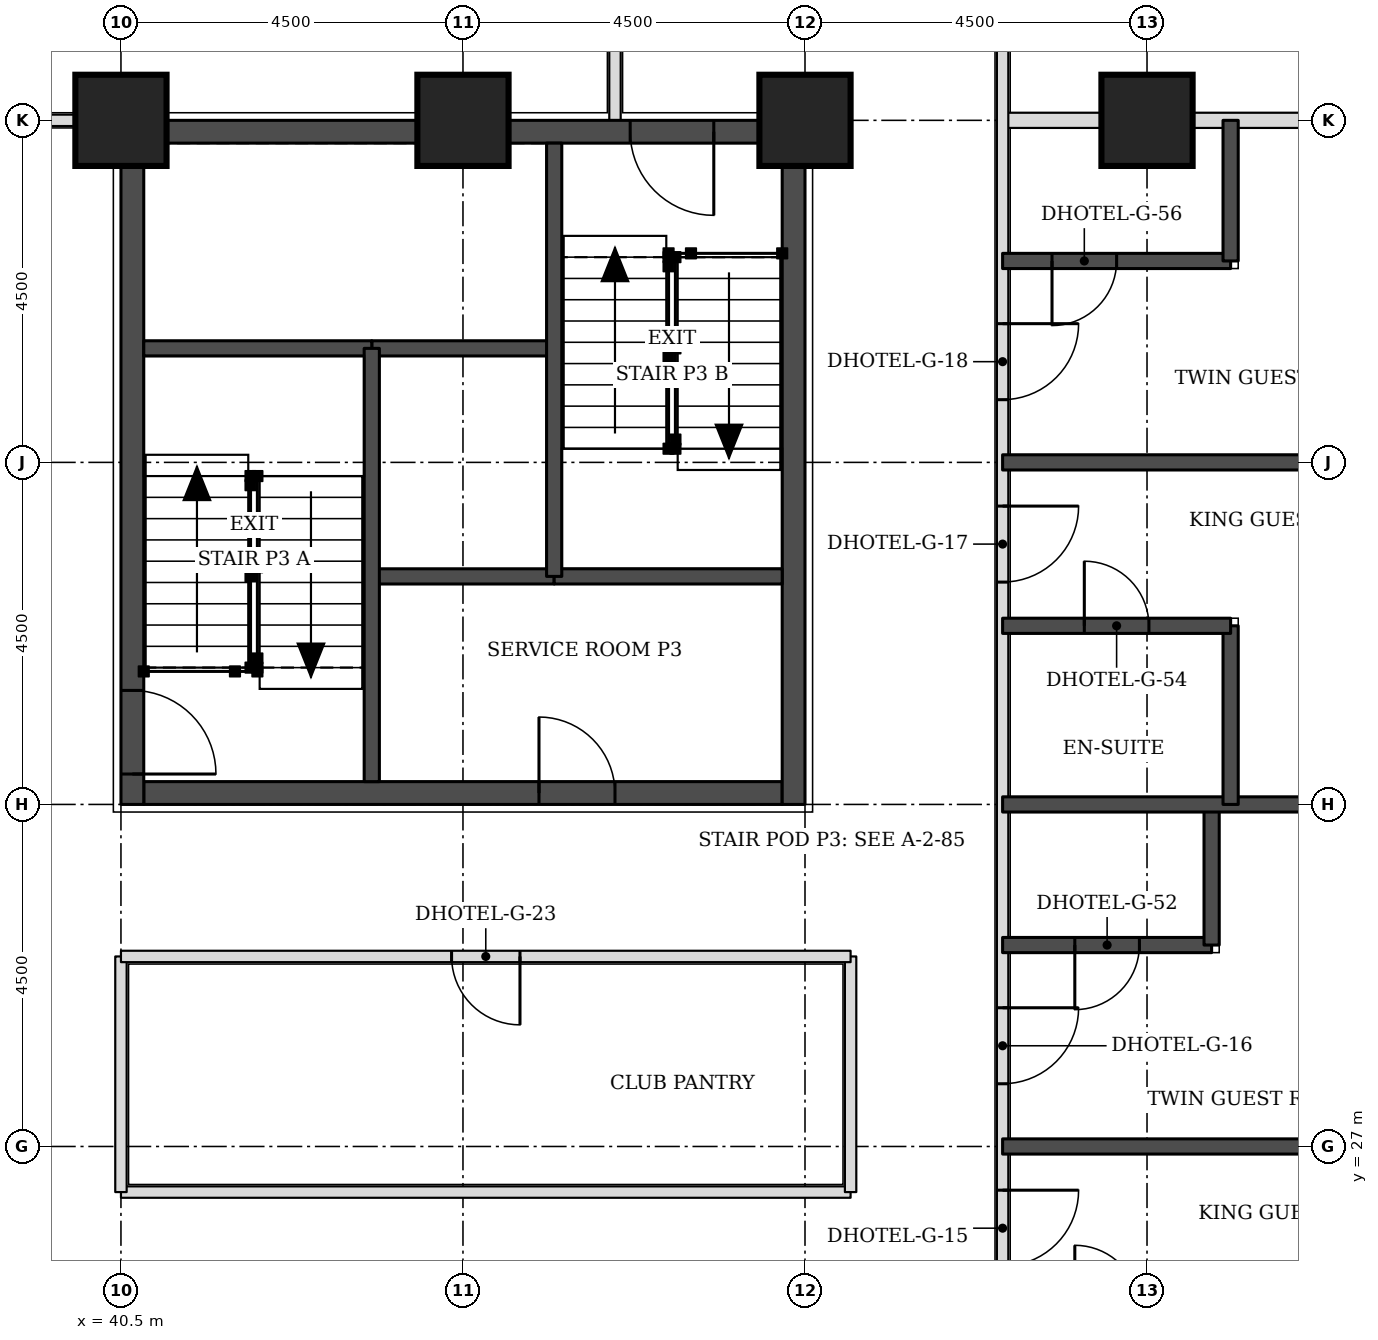
"""IFC4 building model, lengths in metres.
Left out: names, types, materials, properties, quantities, classifications, styles, units other than length and angle.
Written with IfcOpenShell. Run it as: python <this file> out.ifc"""

import sys

from ifc_helpers import new_model, si_unit, direction, frame, frame_2d, origin, origin_2d, place, context, subcontext, project, spatial, rectangle, extrude, element, fill, save


model = new_model("IFC4")
c1 = context("Model", 3, precision=1e-05, world=origin(), true_north=direction((0.0, 1.0)))
c2 = subcontext(c1, "Body", "Model", "MODEL_VIEW")
j1 = project(units=[si_unit("LENGTHUNIT", "METRE"), si_unit("PLANEANGLEUNIT", "RADIAN")], contexts=[c1])
p1 = place(None, origin())
s1 = spatial("IfcSite", under=j1, at=p1, CompositionType="ELEMENT")
p2 = place(p1, origin())
s2 = spatial("IfcBuilding", under=s1, at=p2, CompositionType="ELEMENT")
p3 = place(p2, frame((0.0, 0.0, 66.0)))
s3 = spatial("IfcBuildingStorey", under=s2, at=p3, CompositionType="ELEMENT", Elevation=66.0)
for number, where, z_axis, x_axis in (
    (1, (40.5, 40.5, 0.0), (0.0, 0.0, 1.0), (1.0, 0.0, 0.0)),
    (2, (45.0, 40.5, 0.0), (0.0, 0.0, 1.0), (1.0, 0.0, 0.0)),
    (3, (49.5, 40.5, 0.0), (0.0, 0.0, 1.0), (1.0, 0.0, 0.0)),
    (4, (54.0, 40.5, 0.0), (0.0, 0.0, 1.0), (1.0, 0.0, 0.0)),
):
    element("IfcColumn", number, at=place(p3, frame(where, z_axis=z_axis, x_axis=x_axis)), inside=s3, PredefinedType="COLUMN", context=c2, shape_type="SweptSolid", body=[
        extrude(rectangle(XDim=1.2, YDim=1.2, at=origin_2d()), origin(), (0.0, 0.0, 1.0), 3.3),
    ])
p4 = place(p3, frame((40.8, 31.65, 0.0), z_axis=(0.0, 0.0, 1.0), x_axis=(1.0, 0.0, 0.0)))
e5 = element("IfcWall", 5, at=p4, inside=s3, PredefinedType="SHEAR", context=c2, shape_type="SweptSolid", body=[
    extrude(rectangle(XDim=8.4, YDim=0.3, at=frame_2d((4.2, 0.0))), origin(), (0.0, 0.0, 1.0), 3.3),
])
p5 = place(p4, frame((5.2, 0.0, 0.0)))
e6 = element("IfcOpeningElement", 6, at=p5, cuts=e5, PredefinedType="OPENING", context=c2, shape_type="SweptSolid", body=[
    extrude(rectangle(XDim=1.0, YDim=2.1, at=frame_2d((0.5, 1.05))), frame((0.0, 0.16, 0.0), z_axis=(0.0, -1.0, 0.0), x_axis=(1.0, 0.0, 0.0)), (0.0, 0.0, 1.0), 0.32),
])
p6 = place(p3, frame((40.8, 40.35, 0.0), z_axis=(0.0, 0.0, 1.0), x_axis=(1.0, 0.0, 0.0)))
e7 = element("IfcWall", 7, at=p6, inside=s3, PredefinedType="SHEAR", context=c2, shape_type="SweptSolid", body=[
    extrude(rectangle(XDim=8.4, YDim=0.3, at=frame_2d((4.2, 0.0))), origin(), (0.0, 0.0, 1.0), 3.3),
])
p7 = place(p6, frame((6.4, 0.0, 0.0)))
e8 = element("IfcOpeningElement", 8, at=p7, cuts=e7, PredefinedType="OPENING", context=c2, shape_type="SweptSolid", body=[
    extrude(rectangle(XDim=1.1, YDim=2.1, at=frame_2d((0.55, 1.05))), frame((0.0, 0.16, 0.0), z_axis=(0.0, -1.0, 0.0), x_axis=(1.0, 0.0, 0.0)), (0.0, 0.0, 1.0), 0.32),
])
p8 = place(p3, frame((40.65, 31.5, 0.0), z_axis=(0.0, 0.0, 1.0), x_axis=(0.0, 1.0, 0.0)))
e9 = element("IfcWall", 9, at=p8, inside=s3, PredefinedType="SHEAR", context=c2, shape_type="SweptSolid", body=[
    extrude(rectangle(XDim=9.0, YDim=0.3, at=frame_2d((4.5, 0.0))), origin(), (0.0, 0.0, 1.0), 3.3),
])
p9 = place(p8, frame((0.4, 0.0, 0.0)))
e10 = element("IfcOpeningElement", 10, at=p9, cuts=e9, PredefinedType="OPENING", context=c2, shape_type="SweptSolid", body=[
    extrude(rectangle(XDim=1.1, YDim=2.1, at=frame_2d((0.55, 1.05))), frame((0.0, 0.16, 0.0), z_axis=(0.0, -1.0, 0.0), x_axis=(1.0, 0.0, 0.0)), (0.0, 0.0, 1.0), 0.32),
])
p10 = place(p3, frame((49.35, 31.5, 0.0), z_axis=(0.0, 0.0, 1.0), x_axis=(0.0, 1.0, 0.0)))
e11 = element("IfcWall", 11, at=p10, inside=s3, PredefinedType="SHEAR", context=c2, shape_type="SweptSolid", body=[
    extrude(rectangle(XDim=9.0, YDim=0.3, at=frame_2d((4.5, 0.0))), origin(), (0.0, 0.0, 1.0), 3.3),
])
p11 = place(p3, frame((52.1, 40.5, 0.0), z_axis=(0.0, 0.0, 1.0), x_axis=(1.0, 0.0, 0.0)))
e12 = element("IfcWall", 12, at=p11, inside=s3, PredefinedType="PARTITIONING", context=c2, shape_type="SweptSolid", body=[
    extrude(rectangle(XDim=5.8, YDim=0.2, at=frame_2d((2.9, 0.0))), origin(), (0.0, 0.0, 1.0), 2.33),
])
p12 = place(p3, frame((52.1, 24.4, 0.0), z_axis=(0.0, 0.0, 1.0), x_axis=(0.0, 1.0, 0.0)))
e13 = element("IfcWall", 13, at=p12, inside=s3, PredefinedType="PARTITIONING", context=c2, shape_type="SweptSolid", body=[
    extrude(rectangle(XDim=23.1, YDim=0.15, at=frame_2d((11.55, 0.0))), origin(), (0.0, 0.0, 1.0), 3.08),
])
p13 = place(p12, frame((1.025, 0.0, 0.0)))
e14 = element("IfcOpeningElement", 14, at=p13, cuts=e13, PredefinedType="OPENING", context=c2, shape_type="SweptSolid", body=[
    extrude(rectangle(XDim=1.0, YDim=2.1, at=frame_2d((0.5, 1.05))), frame((0.0, 0.085, 0.0), z_axis=(0.0, -1.0, 0.0), x_axis=(1.0, 0.0, 0.0)), (0.0, 0.0, 1.0), 0.17),
])
p14 = place(p12, frame((3.425, 0.0, 0.0)))
e15 = element("IfcOpeningElement", 15, at=p14, cuts=e13, PredefinedType="OPENING", context=c2, shape_type="SweptSolid", body=[
    extrude(rectangle(XDim=1.0, YDim=2.1, at=frame_2d((0.5, 1.05))), frame((0.0, 0.085, 0.0), z_axis=(0.0, -1.0, 0.0), x_axis=(1.0, 0.0, 0.0)), (0.0, 0.0, 1.0), 0.17),
])
p15 = place(p12, frame((10.025, 0.0, 0.0)))
e16 = element("IfcOpeningElement", 16, at=p15, cuts=e13, PredefinedType="OPENING", context=c2, shape_type="SweptSolid", body=[
    extrude(rectangle(XDim=1.0, YDim=2.1, at=frame_2d((0.5, 1.05))), frame((0.0, 0.085, 0.0), z_axis=(0.0, -1.0, 0.0), x_axis=(1.0, 0.0, 0.0)), (0.0, 0.0, 1.0), 0.17),
])
p16 = place(p12, frame((12.425, 0.0, 0.0)))
e17 = element("IfcOpeningElement", 17, at=p16, cuts=e13, PredefinedType="OPENING", context=c2, shape_type="SweptSolid", body=[
    extrude(rectangle(XDim=1.0, YDim=2.1, at=frame_2d((0.5, 1.05))), frame((0.0, 0.085, 0.0), z_axis=(0.0, -1.0, 0.0), x_axis=(1.0, 0.0, 0.0)), (0.0, 0.0, 1.0), 0.17),
])
p17 = place(p12, frame((19.15, 0.0, 0.0)))
e18 = element("IfcOpeningElement", 18, at=p17, cuts=e13, PredefinedType="OPENING", context=c2, shape_type="SweptSolid", body=[
    extrude(rectangle(XDim=0.9, YDim=2.1, at=frame_2d((0.45, 1.05))), frame((0.0, 0.085, 0.0), z_axis=(0.0, -1.0, 0.0), x_axis=(1.0, 0.0, 0.0)), (0.0, 0.0, 1.0), 0.17),
])
p18 = place(p3, frame((40.5, 26.4, 0.0), z_axis=(0.0, 0.0, 1.0), x_axis=(1.0, 0.0, 0.0)))
e19 = element("IfcWall", 19, at=p18, inside=s3, PredefinedType="PARTITIONING", context=c2, shape_type="SweptSolid", body=[
    extrude(rectangle(XDim=9.6, YDim=0.15, at=frame_2d((4.8, 0.0))), origin(), (0.0, 0.0, 1.0), 3.08),
])
for number, where, z_axis, x_axis in (
    (20, (40.5, 26.4, 0.0), (0.0, 0.0, 1.0), (0.0, 1.0, 0.0)),
    (21, (50.1, 26.4, 0.0), (0.0, 0.0, 1.0), (0.0, 1.0, 0.0)),
):
    element("IfcWall", number, at=place(p3, frame(where, z_axis=z_axis, x_axis=x_axis)), inside=s3, PredefinedType="PARTITIONING", context=c2, shape_type="SweptSolid", body=[
        extrude(rectangle(XDim=3.1, YDim=0.15, at=frame_2d((1.55, 0.0))), origin(), (0.0, 0.0, 1.0), 3.08),
    ])
p19 = place(p3, frame((40.5, 29.5, 0.0), z_axis=(0.0, 0.0, 1.0), x_axis=(1.0, 0.0, 0.0)))
e22 = element("IfcWall", 22, at=p19, inside=s3, PredefinedType="PARTITIONING", context=c2, shape_type="SweptSolid", body=[
    extrude(rectangle(XDim=9.6, YDim=0.15, at=frame_2d((4.8, 0.0))), origin(), (0.0, 0.0, 1.0), 3.08),
])
p20 = place(p19, frame((4.35, 0.0, 0.0)))
e23 = element("IfcOpeningElement", 23, at=p20, cuts=e22, PredefinedType="OPENING", context=c2, shape_type="SweptSolid", body=[
    extrude(rectangle(XDim=0.9, YDim=2.1, at=frame_2d((0.45, 1.05))), frame((0.0, 0.085, 0.0), z_axis=(0.0, -1.0, 0.0), x_axis=(1.0, 0.0, 0.0)), (0.0, 0.0, 1.0), 0.17),
])
p21 = place(p3, frame((38.5, 40.5, 0.0), z_axis=(0.0, 0.0, 1.0), x_axis=(1.0, 0.0, 0.0)))
e24 = element("IfcWall", 24, at=p21, inside=s3, PredefinedType="PARTITIONING", context=c2, shape_type="SweptSolid", body=[
    extrude(rectangle(XDim=1.95, YDim=0.15, at=frame_2d((0.975, 0.0))), origin(), (0.0, 0.0, 1.0), 2.33),
])
p22 = place(p3, frame((47.0, 40.5, 0.0), z_axis=(0.0, 0.0, 1.0), x_axis=(0.0, 1.0, 0.0)))
e25 = element("IfcWall", 25, at=p22, inside=s3, PredefinedType="PARTITIONING", context=c2, shape_type="SweptSolid", body=[
    extrude(rectangle(XDim=7.0, YDim=0.15, at=frame_2d((3.5, 0.0))), origin(), (0.0, 0.0, 1.0), 3.08),
])
p23 = place(p22, frame((3.05, 0.0, 0.0)))
e26 = element("IfcOpeningElement", 26, at=p23, cuts=e25, PredefinedType="OPENING", context=c2, shape_type="SweptSolid", body=[
    extrude(rectangle(XDim=0.9, YDim=2.1, at=frame_2d((0.45, 1.05))), frame((0.0, 0.085, 0.0), z_axis=(0.0, -1.0, 0.0), x_axis=(1.0, 0.0, 0.0)), (0.0, 0.0, 1.0), 0.17),
])
p24 = place(p3, frame((52.1, 27.0, 0.0), z_axis=(0.0, 0.0, 1.0), x_axis=(1.0, 0.0, 0.0)))
e27 = element("IfcWall", 27, at=p24, inside=s3, PredefinedType="SOLIDWALL", context=c2, shape_type="SweptSolid", body=[
    extrude(rectangle(XDim=5.8, YDim=0.2, at=frame_2d((2.9, 0.0))), origin(), (0.0, 0.0, 1.0), 3.08),
])
p25 = place(p3, frame((52.1, 29.65, 0.0), z_axis=(0.0, 0.0, 1.0), x_axis=(1.0, 0.0, 0.0)))
e28 = element("IfcWall", 28, at=p25, inside=s3, PredefinedType="SOLIDWALL", context=c2, shape_type="SweptSolid", body=[
    extrude(rectangle(XDim=2.75, YDim=0.2, at=frame_2d((1.375, 0.0))), origin(), (0.0, 0.0, 1.0), 3.08),
])
p26 = place(p25, frame((0.95, 0.0, 0.0)))
e29 = element("IfcOpeningElement", 29, at=p26, cuts=e28, PredefinedType="OPENING", context=c2, shape_type="SweptSolid", body=[
    extrude(rectangle(XDim=0.85, YDim=2.1, at=frame_2d((0.425, 1.05))), frame((0.0, 0.11, 0.0), z_axis=(0.0, -1.0, 0.0), x_axis=(1.0, 0.0, 0.0)), (0.0, 0.0, 1.0), 0.22),
])
p27 = place(p3, frame((54.85, 29.65, 0.0), z_axis=(0.0, 0.0, 1.0), x_axis=(0.0, 1.0, 0.0)))
e30 = element("IfcWall", 30, at=p27, inside=s3, PredefinedType="SOLIDWALL", context=c2, shape_type="SweptSolid", body=[
    extrude(rectangle(XDim=1.85, YDim=0.2, at=frame_2d((0.925, 0.0))), origin(), (0.0, 0.0, 1.0), 3.08),
])
p28 = place(p3, frame((52.1, 31.5, 0.0), z_axis=(0.0, 0.0, 1.0), x_axis=(1.0, 0.0, 0.0)))
e31 = element("IfcWall", 31, at=p28, inside=s3, PredefinedType="SOLIDWALL", context=c2, shape_type="SweptSolid", body=[
    extrude(rectangle(XDim=5.8, YDim=0.2, at=frame_2d((2.9, 0.0))), origin(), (0.0, 0.0, 1.0), 3.08),
])
p29 = place(p3, frame((55.1, 31.5, 0.0), z_axis=(0.0, 0.0, 1.0), x_axis=(0.0, 1.0, 0.0)))
e32 = element("IfcWall", 32, at=p29, inside=s3, PredefinedType="SOLIDWALL", context=c2, shape_type="SweptSolid", body=[
    extrude(rectangle(XDim=2.35, YDim=0.2, at=frame_2d((1.175, 0.0))), origin(), (0.0, 0.0, 1.0), 3.08),
])
p30 = place(p3, frame((52.1, 33.85, 0.0), z_axis=(0.0, 0.0, 1.0), x_axis=(1.0, 0.0, 0.0)))
e33 = element("IfcWall", 33, at=p30, inside=s3, PredefinedType="SOLIDWALL", context=c2, shape_type="SweptSolid", body=[
    extrude(rectangle(XDim=3.0, YDim=0.2, at=frame_2d((1.5, 0.0))), origin(), (0.0, 0.0, 1.0), 3.08),
])
p31 = place(p30, frame((1.075, 0.0, 0.0)))
e34 = element("IfcOpeningElement", 34, at=p31, cuts=e33, PredefinedType="OPENING", context=c2, shape_type="SweptSolid", body=[
    extrude(rectangle(XDim=0.85, YDim=2.1, at=frame_2d((0.425, 1.05))), frame((0.0, 0.11, 0.0), z_axis=(0.0, -1.0, 0.0), x_axis=(1.0, 0.0, 0.0)), (0.0, 0.0, 1.0), 0.22),
])
p32 = place(p3, frame((52.1, 36.0, 0.0), z_axis=(0.0, 0.0, 1.0), x_axis=(1.0, 0.0, 0.0)))
e35 = element("IfcWall", 35, at=p32, inside=s3, PredefinedType="SOLIDWALL", context=c2, shape_type="SweptSolid", body=[
    extrude(rectangle(XDim=5.8, YDim=0.2, at=frame_2d((2.9, 0.0))), origin(), (0.0, 0.0, 1.0), 3.08),
])
p33 = place(p3, frame((52.1, 38.65, 0.0), z_axis=(0.0, 0.0, 1.0), x_axis=(1.0, 0.0, 0.0)))
e36 = element("IfcWall", 36, at=p33, inside=s3, PredefinedType="SOLIDWALL", context=c2, shape_type="SweptSolid", body=[
    extrude(rectangle(XDim=3.0, YDim=0.2, at=frame_2d((1.5, 0.0))), origin(), (0.0, 0.0, 1.0), 3.08),
])
p34 = place(p33, frame((0.65, 0.0, 0.0)))
e37 = element("IfcOpeningElement", 37, at=p34, cuts=e36, PredefinedType="OPENING", context=c2, shape_type="SweptSolid", body=[
    extrude(rectangle(XDim=0.85, YDim=2.1, at=frame_2d((0.425, 1.05))), frame((0.0, 0.11, 0.0), z_axis=(0.0, -1.0, 0.0), x_axis=(1.0, 0.0, 0.0)), (0.0, 0.0, 1.0), 0.22),
])
p35 = place(p3, frame((55.1, 38.65, 0.0), z_axis=(0.0, 0.0, 1.0), x_axis=(0.0, 1.0, 0.0)))
e38 = element("IfcWall", 38, at=p35, inside=s3, PredefinedType="SOLIDWALL", context=c2, shape_type="SweptSolid", body=[
    extrude(rectangle(XDim=1.85, YDim=0.2, at=frame_2d((0.925, 0.0))), origin(), (0.0, 0.0, 1.0), 3.08),
])
p36 = place(p3, frame((43.8, 34.5, 0.0), z_axis=(0.0, 0.0, 1.0), x_axis=(1.0, 0.0, 0.0)))
e39 = element("IfcWall", 39, at=p36, inside=s3, PredefinedType="SOLIDWALL", context=c2, shape_type="SweptSolid", body=[
    extrude(rectangle(XDim=2.4, YDim=0.2, at=frame_2d((1.2, 0.0))), origin(), (0.0, 0.0, 1.0), 3.08),
])
p37 = place(p3, frame((46.2, 34.5, 0.0), z_axis=(0.0, 0.0, 1.0), x_axis=(1.0, 0.0, 0.0)))
e40 = element("IfcWall", 40, at=p37, inside=s3, PredefinedType="SOLIDWALL", context=c2, shape_type="SweptSolid", body=[
    extrude(rectangle(XDim=3.0, YDim=0.2, at=frame_2d((1.5, 0.0))), origin(), (0.0, 0.0, 1.0), 3.08),
])
p38 = place(p3, frame((43.8, 37.5, 0.0), z_axis=(0.0, 0.0, 1.0), x_axis=(1.0, 0.0, 0.0)))
e41 = element("IfcWall", 41, at=p38, inside=s3, PredefinedType="SOLIDWALL", context=c2, shape_type="SweptSolid", body=[
    extrude(rectangle(XDim=2.4, YDim=0.2, at=frame_2d((1.2, 0.0))), origin(), (0.0, 0.0, 1.0), 3.3),
])
p39 = place(p3, frame((40.8, 37.5, 0.0), z_axis=(0.0, 0.0, 1.0), x_axis=(1.0, 0.0, 0.0)))
e42 = element("IfcWall", 42, at=p39, inside=s3, PredefinedType="SOLIDWALL", context=c2, shape_type="SweptSolid", body=[
    extrude(rectangle(XDim=3.0, YDim=0.2, at=frame_2d((1.5, 0.0))), origin(), (0.0, 0.0, 1.0), 3.08),
])
for number, where, z_axis, x_axis in (
    (43, (43.8, 31.8, 0.0), (0.0, 0.0, 1.0), (0.0, 1.0, 0.0)),
    (44, (46.2, 34.5, 0.0), (0.0, 0.0, 1.0), (0.0, 1.0, 0.0)),
):
    element("IfcWall", number, at=place(p3, frame(where, z_axis=z_axis, x_axis=x_axis)), inside=s3, PredefinedType="SOLIDWALL", context=c2, shape_type="SweptSolid", body=[
        extrude(rectangle(XDim=5.7, YDim=0.2, at=frame_2d((2.85, 0.0))), origin(), (0.0, 0.0, 1.0), 3.08),
    ])
p40 = place(p13, frame((1.0, 0.0, 0.0), z_axis=(0.0, 0.0, 1.0), x_axis=(-1.0, 0.0, 0.0)))
e45 = element("IfcDoor", 45, at=p40, inside=s3, OperationType="SINGLE_SWING_LEFT", PredefinedType="DOOR", context=c2, shape_type="SweptSolid", body=[
    extrude(rectangle(XDim=1.0, YDim=2.1, at=frame_2d((0.5, 1.05))), frame((0.0, 0.025, 0.0), z_axis=(0.0, -1.0, 0.0), x_axis=(1.0, 0.0, 0.0)), (0.0, 0.0, 1.0), 0.05),
])
fill(e14, e45)
p41 = place(p14, frame((1.0, 0.0, 0.0), z_axis=(0.0, 0.0, 1.0), x_axis=(-1.0, 0.0, 0.0)))
e46 = element("IfcDoor", 46, at=p41, inside=s3, OperationType="SINGLE_SWING_LEFT", PredefinedType="DOOR", context=c2, shape_type="SweptSolid", body=[
    extrude(rectangle(XDim=1.0, YDim=2.1, at=frame_2d((0.5, 1.05))), frame((0.0, 0.025, 0.0), z_axis=(0.0, -1.0, 0.0), x_axis=(1.0, 0.0, 0.0)), (0.0, 0.0, 1.0), 0.05),
])
fill(e15, e46)
p42 = place(p26, frame((0.85, 0.0, 0.0), z_axis=(0.0, 0.0, 1.0), x_axis=(-1.0, 0.0, 0.0)))
e47 = element("IfcDoor", 47, at=p42, inside=s3, OperationType="SINGLE_SWING_RIGHT", PredefinedType="DOOR", context=c2, shape_type="SweptSolid", body=[
    extrude(rectangle(XDim=0.85, YDim=2.1, at=frame_2d((0.425, 1.05))), frame((0.0, 0.025, 0.0), z_axis=(0.0, -1.0, 0.0), x_axis=(1.0, 0.0, 0.0)), (0.0, 0.0, 1.0), 0.05),
])
fill(e29, e47)
p43 = place(p15, frame((1.0, 0.0, 0.0), z_axis=(0.0, 0.0, 1.0), x_axis=(-1.0, 0.0, 0.0)))
e48 = element("IfcDoor", 48, at=p43, inside=s3, OperationType="SINGLE_SWING_LEFT", PredefinedType="DOOR", context=c2, shape_type="SweptSolid", body=[
    extrude(rectangle(XDim=1.0, YDim=2.1, at=frame_2d((0.5, 1.05))), frame((0.0, 0.025, 0.0), z_axis=(0.0, -1.0, 0.0), x_axis=(1.0, 0.0, 0.0)), (0.0, 0.0, 1.0), 0.05),
])
fill(e16, e48)
p44 = place(p31, origin())
e49 = element("IfcDoor", 49, at=p44, inside=s3, OperationType="SINGLE_SWING_LEFT", PredefinedType="DOOR", context=c2, shape_type="SweptSolid", body=[
    extrude(rectangle(XDim=0.85, YDim=2.1, at=frame_2d((0.425, 1.05))), frame((0.0, 0.025, 0.0), z_axis=(0.0, -1.0, 0.0), x_axis=(1.0, 0.0, 0.0)), (0.0, 0.0, 1.0), 0.05),
])
fill(e34, e49)
p45 = place(p16, frame((1.0, 0.0, 0.0), z_axis=(0.0, 0.0, 1.0), x_axis=(-1.0, 0.0, 0.0)))
e50 = element("IfcDoor", 50, at=p45, inside=s3, OperationType="SINGLE_SWING_LEFT", PredefinedType="DOOR", context=c2, shape_type="SweptSolid", body=[
    extrude(rectangle(XDim=1.0, YDim=2.1, at=frame_2d((0.5, 1.05))), frame((0.0, 0.025, 0.0), z_axis=(0.0, -1.0, 0.0), x_axis=(1.0, 0.0, 0.0)), (0.0, 0.0, 1.0), 0.05),
])
fill(e17, e50)
p46 = place(p34, frame((0.85, 0.0, 0.0), z_axis=(0.0, 0.0, 1.0), x_axis=(-1.0, 0.0, 0.0)))
e51 = element("IfcDoor", 51, at=p46, inside=s3, OperationType="SINGLE_SWING_RIGHT", PredefinedType="DOOR", context=c2, shape_type="SweptSolid", body=[
    extrude(rectangle(XDim=0.85, YDim=2.1, at=frame_2d((0.425, 1.05))), frame((0.0, 0.025, 0.0), z_axis=(0.0, -1.0, 0.0), x_axis=(1.0, 0.0, 0.0)), (0.0, 0.0, 1.0), 0.05),
])
fill(e37, e51)
p47 = place(p20, frame((0.9, 0.0, 0.0), z_axis=(0.0, 0.0, 1.0), x_axis=(-1.0, 0.0, 0.0)))
e52 = element("IfcDoor", 52, at=p47, inside=s3, OperationType="SINGLE_SWING_LEFT", PredefinedType="DOOR", context=c2, shape_type="SweptSolid", body=[
    extrude(rectangle(XDim=0.9, YDim=2.1, at=frame_2d((0.45, 1.05))), frame((0.0, 0.025, 0.0), z_axis=(0.0, -1.0, 0.0), x_axis=(1.0, 0.0, 0.0)), (0.0, 0.0, 1.0), 0.05),
])
fill(e23, e52)
p48 = place(p9, frame((1.1, 0.0, 0.0), z_axis=(0.0, 0.0, 1.0), x_axis=(-1.0, 0.0, 0.0)))
e53 = element("IfcDoor", 53, at=p48, inside=s3, OperationType="SINGLE_SWING_RIGHT", PredefinedType="DOOR", context=c2, shape_type="SweptSolid", body=[
    extrude(rectangle(XDim=1.1, YDim=2.1, at=frame_2d((0.55, 1.05))), frame((0.0, 0.025, 0.0), z_axis=(0.0, -1.0, 0.0), x_axis=(1.0, 0.0, 0.0)), (0.0, 0.0, 1.0), 0.05),
])
fill(e10, e53)
p49 = place(p7, frame((1.1, 0.0, 0.0), z_axis=(0.0, 0.0, 1.0), x_axis=(-1.0, 0.0, 0.0)))
e54 = element("IfcDoor", 54, at=p49, inside=s3, OperationType="SINGLE_SWING_LEFT", PredefinedType="DOOR", context=c2, shape_type="SweptSolid", body=[
    extrude(rectangle(XDim=1.1, YDim=2.1, at=frame_2d((0.55, 1.05))), frame((0.0, 0.025, 0.0), z_axis=(0.0, -1.0, 0.0), x_axis=(1.0, 0.0, 0.0)), (0.0, 0.0, 1.0), 0.05),
])
fill(e8, e54)
p50 = place(p5, origin())
e55 = element("IfcDoor", 55, at=p50, inside=s3, OperationType="SINGLE_SWING_LEFT", PredefinedType="DOOR", context=c2, shape_type="SweptSolid", body=[
    extrude(rectangle(XDim=1.0, YDim=2.1, at=frame_2d((0.5, 1.05))), frame((0.0, 0.025, 0.0), z_axis=(0.0, -1.0, 0.0), x_axis=(1.0, 0.0, 0.0)), (0.0, 0.0, 1.0), 0.05),
])
fill(e6, e55)
save(model, sys.argv[1])
